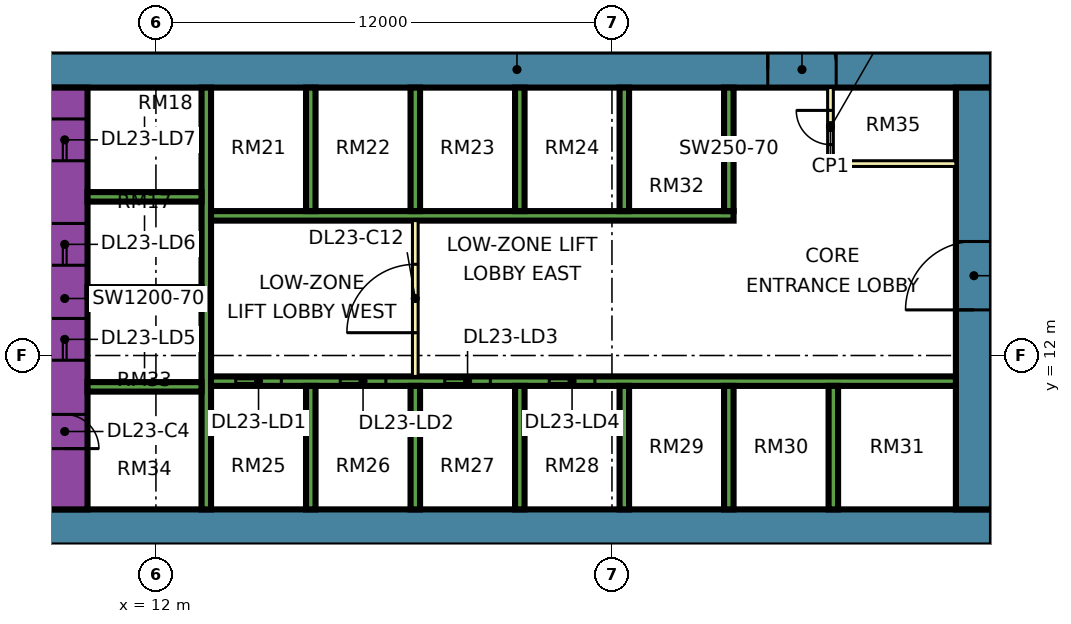
"""IFC4 building model, lengths in metres.
Left out: names, types, materials, properties, quantities, classifications, styles, units other than length and angle.
Written with IfcOpenShell. Run it as: python <this file> out.ifc"""

import sys

from ifc_helpers import new_model, si_unit, direction, frame, frame_2d, origin, place, context, subcontext, project, spatial, rectangle, extrude, element, fill, save


model = new_model("IFC4")
c1 = context("Model", 3, precision=1e-05, world=origin(), true_north=direction((0.0, 1.0)))
c2 = subcontext(c1, "Body", "Model", "MODEL_VIEW")
j1 = project(units=[si_unit("LENGTHUNIT", "METRE"), si_unit("PLANEANGLEUNIT", "RADIAN")], contexts=[c1])
p1 = place(None, origin())
s1 = spatial("IfcSite", under=j1, at=p1, CompositionType="ELEMENT")
p2 = place(p1, origin())
s2 = spatial("IfcBuilding", under=s1, at=p2, CompositionType="ELEMENT")
p3 = place(p2, frame((0.0, 0.0, 103.15)))
s3 = spatial("IfcBuildingStorey", under=s2, at=p3, CompositionType="ELEMENT", Elevation=103.15)
p4 = place(p3, frame((9.0, 7.475, 0.0), z_axis=(0.0, 0.0, 1.0), x_axis=(1.0, 0.0, 0.0)))
e1 = element("IfcWall", 1, at=p4, inside=s3, PredefinedType="SHEAR", context=c2, shape_type="SweptSolid", body=[
    extrude(rectangle(XDim=25.0, YDim=0.95, at=frame_2d((12.5, 0.0))), origin(), (0.0, 0.0, 1.0), 3.75),
])
p5 = place(p3, frame((9.0, 19.525, 0.0), z_axis=(0.0, 0.0, 1.0), x_axis=(1.0, 0.0, 0.0)))
e2 = element("IfcWall", 2, at=p5, inside=s3, PredefinedType="SHEAR", context=c2, shape_type="SweptSolid", body=[
    extrude(rectangle(XDim=25.0, YDim=0.95, at=frame_2d((12.5, 0.0))), origin(), (0.0, 0.0, 1.0), 3.75),
])
p6 = place(p5, frame((19.1, 0.0, 0.0)))
e3 = element("IfcOpeningElement", 3, at=p6, cuts=e2, PredefinedType="OPENING", context=c2, shape_type="SweptSolid", body=[
    extrude(rectangle(XDim=1.8, YDim=2.4, at=frame_2d((0.9, 1.2))), frame((0.0, 0.485, 0.0), z_axis=(0.0, -1.0, 0.0), x_axis=(1.0, 0.0, 0.0)), (0.0, 0.0, 1.0), 0.97),
])
p7 = place(p3, frame((9.6, 7.95, 0.0), z_axis=(0.0, 0.0, 1.0), x_axis=(0.0, 1.0, 0.0)))
e4 = element("IfcWall", 4, at=p7, inside=s3, PredefinedType="SHEAR", context=c2, shape_type="SweptSolid", body=[
    extrude(rectangle(XDim=11.1, YDim=1.2, at=frame_2d((5.55, 0.0))), origin(), (0.0, 0.0, 1.0), 3.75),
])
p8 = place(p7, frame((3.925, 0.0, 0.0)))
e5 = element("IfcOpeningElement", 5, at=p8, cuts=e4, PredefinedType="OPENING", context=c2, shape_type="SweptSolid", body=[
    extrude(rectangle(XDim=1.1, YDim=2.2, at=frame_2d((0.55, 1.1))), frame((0.0, 0.61, 0.0), z_axis=(0.0, -1.0, 0.0), x_axis=(1.0, 0.0, 0.0)), (0.0, 0.0, 1.0), 1.22),
])
p9 = place(p7, frame((6.425, 0.0, 0.0)))
e6 = element("IfcOpeningElement", 6, at=p9, cuts=e4, PredefinedType="OPENING", context=c2, shape_type="SweptSolid", body=[
    extrude(rectangle(XDim=1.1, YDim=2.2, at=frame_2d((0.55, 1.1))), frame((0.0, 0.61, 0.0), z_axis=(0.0, -1.0, 0.0), x_axis=(1.0, 0.0, 0.0)), (0.0, 0.0, 1.0), 1.22),
])
p10 = place(p7, frame((9.175, 0.0, 0.0)))
e7 = element("IfcOpeningElement", 7, at=p10, cuts=e4, PredefinedType="OPENING", context=c2, shape_type="SweptSolid", body=[
    extrude(rectangle(XDim=1.1, YDim=2.2, at=frame_2d((0.55, 1.1))), frame((0.0, 0.61, 0.0), z_axis=(0.0, -1.0, 0.0), x_axis=(1.0, 0.0, 0.0)), (0.0, 0.0, 1.0), 1.22),
])
p11 = place(p7, frame((1.6, 0.0, 0.0)))
e8 = element("IfcOpeningElement", 8, at=p11, cuts=e4, PredefinedType="OPENING", context=c2, shape_type="SweptSolid", body=[
    extrude(rectangle(XDim=0.9, YDim=2.1, at=frame_2d((0.45, 1.05))), frame((0.0, 0.61, 0.0), z_axis=(0.0, -1.0, 0.0), x_axis=(1.0, 0.0, 0.0)), (0.0, 0.0, 1.0), 1.22),
])
p12 = place(p3, frame((33.525, 7.95, 0.0), z_axis=(0.0, 0.0, 1.0), x_axis=(0.0, 1.0, 0.0)))
e9 = element("IfcWall", 9, at=p12, inside=s3, PredefinedType="SHEAR", context=c2, shape_type="SweptSolid", body=[
    extrude(rectangle(XDim=11.1, YDim=0.95, at=frame_2d((5.55, 0.0))), origin(), (0.0, 0.0, 1.0), 3.75),
])
p13 = place(p12, frame((5.25, 0.0, 0.0)))
e10 = element("IfcOpeningElement", 10, at=p13, cuts=e9, PredefinedType="OPENING", context=c2, shape_type="SweptSolid", body=[
    extrude(rectangle(XDim=1.8, YDim=2.4, at=frame_2d((0.9, 1.2))), frame((0.0, 0.485, 0.0), z_axis=(0.0, -1.0, 0.0), x_axis=(1.0, 0.0, 0.0)), (0.0, 0.0, 1.0), 0.97),
])
p14 = place(p3, frame((13.325, 7.95, 0.0), z_axis=(0.0, 0.0, 1.0), x_axis=(0.0, 1.0, 0.0)))
e11 = element("IfcWall", 11, at=p14, inside=s3, PredefinedType="SHEAR", context=c2, shape_type="SweptSolid", body=[
    extrude(rectangle(XDim=11.1, YDim=0.25, at=frame_2d((5.55, 0.0))), origin(), (0.0, 0.0, 1.0), 3.75),
])
p15 = place(p3, frame((13.45, 11.325, 0.0), z_axis=(0.0, 0.0, 1.0), x_axis=(1.0, 0.0, 0.0)))
e12 = element("IfcWall", 12, at=p15, inside=s3, PredefinedType="SHEAR", context=c2, shape_type="SweptSolid", body=[
    extrude(rectangle(XDim=19.6, YDim=0.25, at=frame_2d((9.8, 0.0))), origin(), (0.0, 0.0, 1.0), 3.75),
])
p16 = place(p15, frame((0.65, 0.0, 0.0)))
e13 = element("IfcOpeningElement", 13, at=p16, cuts=e12, PredefinedType="OPENING", context=c2, shape_type="SweptSolid", body=[
    extrude(rectangle(XDim=1.2, YDim=2.2, at=frame_2d((0.6, 1.1))), frame((0.0, 0.135, 0.0), z_axis=(0.0, -1.0, 0.0), x_axis=(1.0, 0.0, 0.0)), (0.0, 0.0, 1.0), 0.27),
])
p17 = place(p15, frame((3.4, 0.0, 0.0)))
e14 = element("IfcOpeningElement", 14, at=p17, cuts=e12, PredefinedType="OPENING", context=c2, shape_type="SweptSolid", body=[
    extrude(rectangle(XDim=1.2, YDim=2.2, at=frame_2d((0.6, 1.1))), frame((0.0, 0.135, 0.0), z_axis=(0.0, -1.0, 0.0), x_axis=(1.0, 0.0, 0.0)), (0.0, 0.0, 1.0), 0.27),
])
p18 = place(p15, frame((6.15, 0.0, 0.0)))
e15 = element("IfcOpeningElement", 15, at=p18, cuts=e12, PredefinedType="OPENING", context=c2, shape_type="SweptSolid", body=[
    extrude(rectangle(XDim=1.2, YDim=2.2, at=frame_2d((0.6, 1.1))), frame((0.0, 0.135, 0.0), z_axis=(0.0, -1.0, 0.0), x_axis=(1.0, 0.0, 0.0)), (0.0, 0.0, 1.0), 0.27),
])
p19 = place(p15, frame((8.9, 0.0, 0.0)))
e16 = element("IfcOpeningElement", 16, at=p19, cuts=e12, PredefinedType="OPENING", context=c2, shape_type="SweptSolid", body=[
    extrude(rectangle(XDim=1.2, YDim=2.2, at=frame_2d((0.6, 1.1))), frame((0.0, 0.135, 0.0), z_axis=(0.0, -1.0, 0.0), x_axis=(1.0, 0.0, 0.0)), (0.0, 0.0, 1.0), 0.27),
])
p20 = place(p3, frame((13.45, 15.675, 0.0), z_axis=(0.0, 0.0, 1.0), x_axis=(1.0, 0.0, 0.0)))
e17 = element("IfcWall", 17, at=p20, inside=s3, PredefinedType="SHEAR", context=c2, shape_type="SweptSolid", body=[
    extrude(rectangle(XDim=13.75, YDim=0.25, at=frame_2d((6.875, 0.0))), origin(), (0.0, 0.0, 1.0), 3.75),
])
for number, where, z_axis, x_axis in (
    (18, (10.2, 11.175, 0.0), (0.0, 0.0, 1.0), (1.0, 0.0, 0.0)),
    (19, (10.2, 13.675, 0.0), (0.0, 0.0, 1.0), (1.0, 0.0, 0.0)),
    (20, (10.2, 16.175, 0.0), (0.0, 0.0, 1.0), (1.0, 0.0, 0.0)),
):
    element("IfcWall", number, at=place(p3, frame(where, z_axis=z_axis, x_axis=x_axis)), inside=s3, PredefinedType="SHEAR", context=c2, shape_type="SweptSolid", body=[
        extrude(rectangle(XDim=3.0, YDim=0.25, at=frame_2d((1.5, 0.0))), origin(), (0.0, 0.0, 1.0), 3.75),
    ])
for number, where, z_axis, x_axis in (
    (21, (16.075, 7.95, 0.0), (0.0, 0.0, 1.0), (0.0, 1.0, 0.0)),
    (22, (18.825, 7.95, 0.0), (0.0, 0.0, 1.0), (0.0, 1.0, 0.0)),
    (23, (21.575, 7.95, 0.0), (0.0, 0.0, 1.0), (0.0, 1.0, 0.0)),
    (24, (24.325, 7.95, 0.0), (0.0, 0.0, 1.0), (0.0, 1.0, 0.0)),
    (25, (27.075, 7.95, 0.0), (0.0, 0.0, 1.0), (0.0, 1.0, 0.0)),
    (26, (29.825, 7.95, 0.0), (0.0, 0.0, 1.0), (0.0, 1.0, 0.0)),
    (27, (16.075, 15.8, 0.0), (0.0, 0.0, 1.0), (0.0, 1.0, 0.0)),
    (28, (18.825, 15.8, 0.0), (0.0, 0.0, 1.0), (0.0, 1.0, 0.0)),
    (29, (21.575, 15.8, 0.0), (0.0, 0.0, 1.0), (0.0, 1.0, 0.0)),
    (30, (24.325, 15.8, 0.0), (0.0, 0.0, 1.0), (0.0, 1.0, 0.0)),
    (31, (27.075, 15.8, 0.0), (0.0, 0.0, 1.0), (0.0, 1.0, 0.0)),
):
    element("IfcWall", number, at=place(p3, frame(where, z_axis=z_axis, x_axis=x_axis)), inside=s3, PredefinedType="SHEAR", context=c2, shape_type="SweptSolid", body=[
        extrude(rectangle(XDim=3.25, YDim=0.25, at=frame_2d((1.625, 0.0))), origin(), (0.0, 0.0, 1.0), 3.75),
    ])
p21 = place(p3, frame((-1.447, 12.553, 0.0), z_axis=(0.0, 0.0, 1.0), x_axis=(0.707106781187, -0.707106781187, 0.0)))
e32 = element("IfcWall", 32, at=p21, inside=s3, PredefinedType="SOLIDWALL", context=c2, shape_type="SweptSolid", body=[
    extrude(rectangle(XDim=19.799, YDim=0.15, at=frame_2d((9.899, 0.0))), origin(), (0.0, 0.0, 1.0), 3.35),
])
p22 = place(p21, frame((2.212, 0.0, 0.45)))
e33 = element("IfcOpeningElement", 33, at=p22, cuts=e32, PredefinedType="OPENING", context=c2, shape_type="SweptSolid", body=[
    extrude(rectangle(XDim=3.0, YDim=2.4, at=frame_2d((1.5, 1.2))), frame((0.0, 0.085, 0.0), z_axis=(0.0, -1.0, 0.0), x_axis=(1.0, 0.0, 0.0)), (0.0, 0.0, 1.0), 0.17),
])
p23 = place(p21, frame((10.216, 0.0, 0.45)))
e34 = element("IfcOpeningElement", 34, at=p23, cuts=e32, PredefinedType="OPENING", context=c2, shape_type="SweptSolid", body=[
    extrude(rectangle(XDim=3.0, YDim=2.4, at=frame_2d((1.5, 1.2))), frame((0.0, 0.085, 0.0), z_axis=(0.0, -1.0, 0.0), x_axis=(1.0, 0.0, 0.0)), (0.0, 0.0, 1.0), 0.17),
])
p24 = place(p3, frame((18.825, 11.45, 0.0), z_axis=(0.0, 0.0, 1.0), x_axis=(0.0, 1.0, 0.0)))
e35 = element("IfcWall", 35, at=p24, inside=s3, PredefinedType="PARTITIONING", context=c2, shape_type="SweptSolid", body=[
    extrude(rectangle(XDim=4.1, YDim=0.15, at=frame_2d((2.05, 0.0))), origin(), (0.0, 0.0, 1.0), 3.35),
])
p25 = place(p24, frame((1.15, 0.0, 0.0)))
e36 = element("IfcOpeningElement", 36, at=p25, cuts=e35, PredefinedType="OPENING", context=c2, shape_type="SweptSolid", body=[
    extrude(rectangle(XDim=1.8, YDim=2.4, at=frame_2d((0.9, 1.2))), frame((0.0, 0.085, 0.0), z_axis=(0.0, -1.0, 0.0), x_axis=(1.0, 0.0, 0.0)), (0.0, 0.0, 1.0), 0.17),
])
p26 = place(p3, frame((29.75, 17.05, 0.0), z_axis=(0.0, 0.0, 1.0), x_axis=(0.0, 1.0, 0.0)))
e37 = element("IfcWall", 37, at=p26, inside=s3, PredefinedType="PARTITIONING", context=c2, shape_type="SweptSolid", body=[
    extrude(rectangle(XDim=2.0, YDim=0.15, at=frame_2d((1.0, 0.0))), origin(), (0.0, 0.0, 1.0), 3.35),
])
p27 = place(p26, frame((0.5, 0.0, 0.0)))
e38 = element("IfcOpeningElement", 38, at=p27, cuts=e37, PredefinedType="OPENING", context=c2, shape_type="SweptSolid", body=[
    extrude(rectangle(XDim=0.9, YDim=2.1, at=frame_2d((0.45, 1.05))), frame((0.0, 0.085, 0.0), z_axis=(0.0, -1.0, 0.0), x_axis=(1.0, 0.0, 0.0)), (0.0, 0.0, 1.0), 0.17),
])
p28 = place(p3, frame((29.75, 17.05, 0.0), z_axis=(0.0, 0.0, 1.0), x_axis=(1.0, 0.0, 0.0)))
e39 = element("IfcWall", 39, at=p28, inside=s3, PredefinedType="PARTITIONING", context=c2, shape_type="SweptSolid", body=[
    extrude(rectangle(XDim=3.3, YDim=0.15, at=frame_2d((1.65, 0.0))), origin(), (0.0, 0.0, 1.0), 3.35),
])
p29 = place(p16, origin())
e40 = element("IfcDoor", 40, at=p29, inside=s3, OperationType="DOUBLE_DOOR_SLIDING", PredefinedType="DOOR", context=c2, shape_type="SweptSolid", body=[
    extrude(rectangle(XDim=1.2, YDim=2.2, at=frame_2d((0.6, 1.1))), frame((0.0, 0.025, 0.0), z_axis=(0.0, -1.0, 0.0), x_axis=(1.0, 0.0, 0.0)), (0.0, 0.0, 1.0), 0.05),
])
fill(e13, e40)
p30 = place(p17, origin())
e41 = element("IfcDoor", 41, at=p30, inside=s3, OperationType="DOUBLE_DOOR_SLIDING", PredefinedType="DOOR", context=c2, shape_type="SweptSolid", body=[
    extrude(rectangle(XDim=1.2, YDim=2.2, at=frame_2d((0.6, 1.1))), frame((0.0, 0.025, 0.0), z_axis=(0.0, -1.0, 0.0), x_axis=(1.0, 0.0, 0.0)), (0.0, 0.0, 1.0), 0.05),
])
fill(e14, e41)
p31 = place(p18, origin())
e42 = element("IfcDoor", 42, at=p31, inside=s3, OperationType="DOUBLE_DOOR_SLIDING", PredefinedType="DOOR", context=c2, shape_type="SweptSolid", body=[
    extrude(rectangle(XDim=1.2, YDim=2.2, at=frame_2d((0.6, 1.1))), frame((0.0, 0.025, 0.0), z_axis=(0.0, -1.0, 0.0), x_axis=(1.0, 0.0, 0.0)), (0.0, 0.0, 1.0), 0.05),
])
fill(e15, e42)
p32 = place(p19, origin())
e43 = element("IfcDoor", 43, at=p32, inside=s3, OperationType="DOUBLE_DOOR_SLIDING", PredefinedType="DOOR", context=c2, shape_type="SweptSolid", body=[
    extrude(rectangle(XDim=1.2, YDim=2.2, at=frame_2d((0.6, 1.1))), frame((0.0, 0.025, 0.0), z_axis=(0.0, -1.0, 0.0), x_axis=(1.0, 0.0, 0.0)), (0.0, 0.0, 1.0), 0.05),
])
fill(e16, e43)
p33 = place(p8, origin())
e44 = element("IfcDoor", 44, at=p33, inside=s3, OperationType="DOUBLE_DOOR_SLIDING", PredefinedType="DOOR", context=c2, shape_type="SweptSolid", body=[
    extrude(rectangle(XDim=1.1, YDim=2.2, at=frame_2d((0.55, 1.1))), frame((0.0, 0.025, 0.0), z_axis=(0.0, -1.0, 0.0), x_axis=(1.0, 0.0, 0.0)), (0.0, 0.0, 1.0), 0.05),
])
fill(e5, e44)
p34 = place(p9, origin())
e45 = element("IfcDoor", 45, at=p34, inside=s3, OperationType="DOUBLE_DOOR_SLIDING", PredefinedType="DOOR", context=c2, shape_type="SweptSolid", body=[
    extrude(rectangle(XDim=1.1, YDim=2.2, at=frame_2d((0.55, 1.1))), frame((0.0, 0.025, 0.0), z_axis=(0.0, -1.0, 0.0), x_axis=(1.0, 0.0, 0.0)), (0.0, 0.0, 1.0), 0.05),
])
fill(e6, e45)
p35 = place(p10, origin())
e46 = element("IfcDoor", 46, at=p35, inside=s3, OperationType="DOUBLE_DOOR_SLIDING", PredefinedType="DOOR", context=c2, shape_type="SweptSolid", body=[
    extrude(rectangle(XDim=1.1, YDim=2.2, at=frame_2d((0.55, 1.1))), frame((0.0, 0.025, 0.0), z_axis=(0.0, -1.0, 0.0), x_axis=(1.0, 0.0, 0.0)), (0.0, 0.0, 1.0), 0.05),
])
fill(e7, e46)
p36 = place(p13, origin())
e47 = element("IfcDoor", 47, at=p36, inside=s3, OperationType="DOUBLE_DOOR_SINGLE_SWING", PredefinedType="DOOR", context=c2, shape_type="SweptSolid", body=[
    extrude(rectangle(XDim=1.8, YDim=2.4, at=frame_2d((0.9, 1.2))), frame((0.0, 0.025, 0.0), z_axis=(0.0, -1.0, 0.0), x_axis=(1.0, 0.0, 0.0)), (0.0, 0.0, 1.0), 0.05),
])
fill(e10, e47)
p37 = place(p6, origin())
e48 = element("IfcDoor", 48, at=p37, inside=s3, OperationType="DOUBLE_DOOR_SINGLE_SWING", PredefinedType="DOOR", context=c2, shape_type="SweptSolid", body=[
    extrude(rectangle(XDim=1.8, YDim=2.4, at=frame_2d((0.9, 1.2))), frame((0.0, 0.025, 0.0), z_axis=(0.0, -1.0, 0.0), x_axis=(1.0, 0.0, 0.0)), (0.0, 0.0, 1.0), 0.05),
])
fill(e3, e48)
p38 = place(p11, frame((0.9, 0.0, 0.0), z_axis=(0.0, 0.0, 1.0), x_axis=(-1.0, 0.0, 0.0)))
e49 = element("IfcDoor", 49, at=p38, inside=s3, OperationType="SINGLE_SWING_LEFT", PredefinedType="DOOR", context=c2, shape_type="SweptSolid", body=[
    extrude(rectangle(XDim=0.9, YDim=2.1, at=frame_2d((0.45, 1.05))), frame((0.0, 0.025, 0.0), z_axis=(0.0, -1.0, 0.0), x_axis=(1.0, 0.0, 0.0)), (0.0, 0.0, 1.0), 0.05),
])
fill(e8, e49)
p39 = place(p25, origin())
e50 = element("IfcDoor", 50, at=p39, inside=s3, OperationType="DOUBLE_DOOR_SINGLE_SWING", PredefinedType="DOOR", context=c2, shape_type="SweptSolid", body=[
    extrude(rectangle(XDim=1.8, YDim=2.4, at=frame_2d((0.9, 1.2))), frame((0.0, 0.025, 0.0), z_axis=(0.0, -1.0, 0.0), x_axis=(1.0, 0.0, 0.0)), (0.0, 0.0, 1.0), 0.05),
])
fill(e36, e50)
p40 = place(p27, frame((0.9, 0.0, 0.0), z_axis=(0.0, 0.0, 1.0), x_axis=(-1.0, 0.0, 0.0)))
e51 = element("IfcDoor", 51, at=p40, inside=s3, OperationType="SINGLE_SWING_RIGHT", PredefinedType="DOOR", context=c2, shape_type="SweptSolid", body=[
    extrude(rectangle(XDim=0.9, YDim=2.1, at=frame_2d((0.45, 1.05))), frame((0.0, 0.025, 0.0), z_axis=(0.0, -1.0, 0.0), x_axis=(1.0, 0.0, 0.0)), (0.0, 0.0, 1.0), 0.05),
])
fill(e38, e51)
save(model, sys.argv[1])
